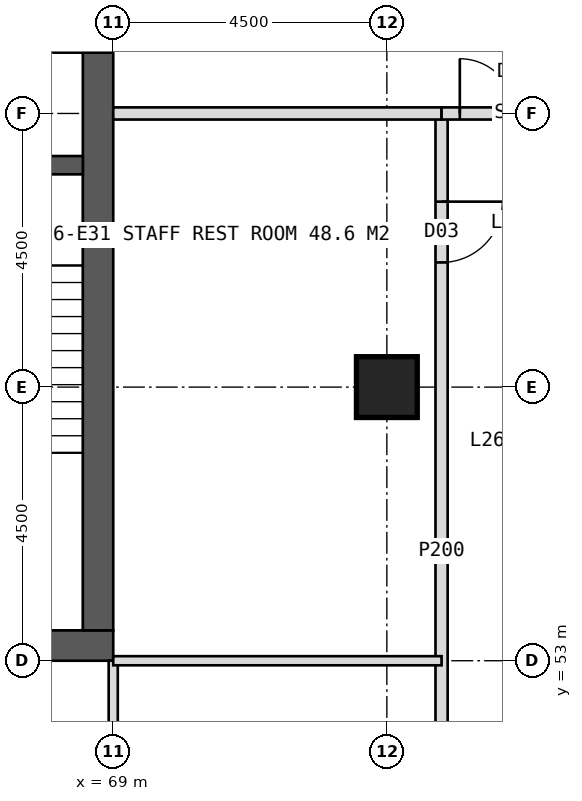
"""IFC4 building model, lengths in metres.
Left out: names, types, materials, properties, quantities, classifications, styles, units other than length and angle.
Written with IfcOpenShell. Run it as: python <this file> out.ifc"""

import sys

from ifc_helpers import new_model, si_unit, direction, frame, frame_2d, origin, origin_2d, place, context, subcontext, project, spatial, rectangle, hollow_rectangle, extrude, element, fill, save


model = new_model("IFC4")
c1 = context("Model", 3, precision=1e-05, world=origin(), true_north=direction((0.0, 1.0)))
c2 = subcontext(c1, "Body", "Model", "MODEL_VIEW")
j1 = project(units=[si_unit("LENGTHUNIT", "METRE"), si_unit("PLANEANGLEUNIT", "RADIAN")], contexts=[c1])
p1 = place(None, origin())
s1 = spatial("IfcSite", under=j1, at=p1, CompositionType="ELEMENT")
p2 = place(p1, origin())
s2 = spatial("IfcBuilding", under=s1, at=p2, CompositionType="ELEMENT")
p3 = place(p2, frame((0.0, 0.0, 112.0)))
s3 = spatial("IfcBuildingStorey", under=s2, at=p3, CompositionType="ELEMENT", Elevation=112.0)
p4 = place(p3, frame((51.0, 53.25, 0.0), z_axis=(0.0, 0.0, 1.0), x_axis=(1.0, 0.0, 0.0)))
e1 = element("IfcWall", 1, at=p4, inside=s3, PredefinedType="SHEAR", context=c2, shape_type="SweptSolid", body=[
    extrude(rectangle(XDim=18.0, YDim=0.5, at=frame_2d((9.0, 0.0))), origin(), (0.0, 0.0, 1.0), 4.0),
])
p5 = place(p4, frame((8.1, 0.0, 0.0)))
e2 = element("IfcOpeningElement", 2, at=p5, cuts=e1, PredefinedType="OPENING", context=c2, shape_type="SweptSolid", body=[
    extrude(rectangle(XDim=1.8, YDim=2.2, at=frame_2d((0.9, 1.1))), frame((0.0, 0.26, 0.0), z_axis=(0.0, -1.0, 0.0), x_axis=(1.0, 0.0, 0.0)), (0.0, 0.0, 1.0), 0.52),
])
p6 = place(p3, frame((68.75, 53.5, 0.0), z_axis=(0.0, 0.0, 1.0), x_axis=(0.0, 1.0, 0.0)))
e3 = element("IfcWall", 3, at=p6, inside=s3, PredefinedType="SHEAR", context=c2, shape_type="SweptSolid", body=[
    extrude(rectangle(XDim=17.0, YDim=0.5, at=frame_2d((8.5, 0.0))), origin(), (0.0, 0.0, 1.0), 4.0),
])
p7 = place(p6, frame((9.5, 0.0, 0.0)))
e4 = element("IfcOpeningElement", 4, at=p7, cuts=e3, PredefinedType="OPENING", context=c2, shape_type="SweptSolid", body=[
    extrude(rectangle(XDim=1.5, YDim=2.2, at=frame_2d((0.75, 1.1))), frame((0.0, 0.26, 0.0), z_axis=(0.0, -1.0, 0.0), x_axis=(1.0, 0.0, 0.0)), (0.0, 0.0, 1.0), 0.52),
])
p8 = place(p3, frame((65.2, 61.15, 0.0), z_axis=(0.0, 0.0, 1.0), x_axis=(1.0, 0.0, 0.0)))
e5 = element("IfcWall", 5, at=p8, inside=s3, PredefinedType="SHEAR", context=c2, shape_type="SweptSolid", body=[
    extrude(rectangle(XDim=3.3, YDim=0.3, at=frame_2d((1.65, 0.0))), origin(), (0.0, 0.0, 1.0), 4.0),
])
p9 = place(p8, frame((1.05, 0.0, 0.0)))
e6 = element("IfcOpeningElement", 6, at=p9, cuts=e5, PredefinedType="OPENING", context=c2, shape_type="SweptSolid", body=[
    extrude(rectangle(XDim=1.2, YDim=2.1, at=frame_2d((0.6, 1.05))), frame((0.0, 0.16, 0.0), z_axis=(0.0, -1.0, 0.0), x_axis=(1.0, 0.0, 0.0)), (0.0, 0.0, 1.0), 0.32),
])
p10 = place(p3, frame((73.5, 57.5, 0.0), z_axis=(0.0, 0.0, 1.0), x_axis=(1.0, 0.0, 0.0)))
e7 = element("IfcColumn", 7, at=p10, inside=s3, PredefinedType="COLUMN", context=c2, shape_type="SweptSolid", body=[
    extrude(hollow_rectangle(XDim=1.0, YDim=1.0, WallThickness=0.1, at=origin_2d()), origin(), (0.0, 0.0, 1.0), 4.0),
])
p11 = place(p3, frame((69.0, 53.0, 0.0), z_axis=(0.0, 0.0, 1.0), x_axis=(0.0, -1.0, 0.0)))
e8 = element("IfcWall", 8, at=p11, inside=s3, PredefinedType="PARTITIONING", context=c2, shape_type="SweptSolid", body=[
    extrude(rectangle(XDim=5.4, YDim=0.15, at=frame_2d((2.7, 0.0))), origin(), (0.0, 0.0, 1.0), 3.75),
])
p12 = place(p3, frame((74.4, 62.0, 0.0), z_axis=(0.0, 0.0, 1.0), x_axis=(0.0, -1.0, 0.0)))
e9 = element("IfcWall", 9, at=p12, inside=s3, PredefinedType="PARTITIONING", context=c2, shape_type="SweptSolid", body=[
    extrude(rectangle(XDim=14.4, YDim=0.2, at=frame_2d((7.2, 0.0))), origin(), (0.0, 0.0, 1.0), 3.75),
])
p13 = place(p12, frame((1.45, 0.0, 0.0)))
e10 = element("IfcOpeningElement", 10, at=p13, cuts=e9, PredefinedType="OPENING", context=c2, shape_type="SweptSolid", body=[
    extrude(rectangle(XDim=1.0, YDim=2.1, at=frame_2d((0.5, 1.05))), frame((0.0, 0.11, 0.0), z_axis=(0.0, -1.0, 0.0), x_axis=(1.0, 0.0, 0.0)), (0.0, 0.0, 1.0), 0.22),
])
p14 = place(p12, frame((11.2, 0.0, 0.0)))
e11 = element("IfcOpeningElement", 11, at=p14, cuts=e9, PredefinedType="OPENING", context=c2, shape_type="SweptSolid", body=[
    extrude(rectangle(XDim=1.0, YDim=2.1, at=frame_2d((0.5, 1.05))), frame((0.0, 0.11, 0.0), z_axis=(0.0, -1.0, 0.0), x_axis=(1.0, 0.0, 0.0)), (0.0, 0.0, 1.0), 0.22),
])
p15 = place(p3, frame((69.0, 62.0, 0.0), z_axis=(0.0, 0.0, 1.0), x_axis=(1.0, 0.0, 0.0)))
e12 = element("IfcWall", 12, at=p15, inside=s3, PredefinedType="SOLIDWALL", context=c2, shape_type="SweptSolid", body=[
    extrude(rectangle(XDim=5.4, YDim=0.2, at=frame_2d((2.7, 0.0))), origin(), (0.0, 0.0, 1.0), 2.95),
])
p16 = place(p3, frame((69.0, 53.0, 0.0), z_axis=(0.0, 0.0, 1.0), x_axis=(1.0, 0.0, 0.0)))
e13 = element("IfcWall", 13, at=p16, inside=s3, PredefinedType="PARTITIONING", context=c2, shape_type="SweptSolid", body=[
    extrude(rectangle(XDim=5.4, YDim=0.15, at=frame_2d((2.7, 0.0))), origin(), (0.0, 0.0, 1.0), 3.75),
])
p17 = place(p3, frame((74.4, 62.0, 0.0), z_axis=(0.0, 0.0, 1.0), x_axis=(1.0, 0.0, 0.0)))
e14 = element("IfcWall", 14, at=p17, inside=s3, PredefinedType="SOLIDWALL", context=c2, shape_type="SweptSolid", body=[
    extrude(rectangle(XDim=2.7, YDim=0.2, at=frame_2d((1.35, 0.0))), origin(), (0.0, 0.0, 1.0), 2.95),
])
p18 = place(p17, frame((0.3, 0.0, 0.0)))
e15 = element("IfcOpeningElement", 15, at=p18, cuts=e14, PredefinedType="OPENING", context=c2, shape_type="SweptSolid", body=[
    extrude(rectangle(XDim=1.8, YDim=2.2, at=frame_2d((0.9, 1.1))), frame((0.0, 0.11, 0.0), z_axis=(0.0, -1.0, 0.0), x_axis=(1.0, 0.0, 0.0)), (0.0, 0.0, 1.0), 0.22),
])
p19 = place(p13, origin())
e16 = element("IfcDoor", 16, at=p19, inside=s3, OperationType="SINGLE_SWING_LEFT", PredefinedType="DOOR", context=c2, shape_type="SweptSolid", body=[
    extrude(rectangle(XDim=1.0, YDim=2.1, at=frame_2d((0.5, 1.05))), frame((0.0, 0.025, 0.0), z_axis=(0.0, -1.0, 0.0), x_axis=(1.0, 0.0, 0.0)), (0.0, 0.0, 1.0), 0.05),
])
fill(e10, e16)
p20 = place(p18, origin())
e17 = element("IfcDoor", 17, at=p20, inside=s3, OperationType="DOUBLE_DOOR_DOUBLE_SWING", PredefinedType="DOOR", context=c2, shape_type="SweptSolid", body=[
    extrude(rectangle(XDim=1.8, YDim=2.2, at=frame_2d((0.9, 1.1))), frame((0.0, 0.025, 0.0), z_axis=(0.0, -1.0, 0.0), x_axis=(1.0, 0.0, 0.0)), (0.0, 0.0, 1.0), 0.05),
])
fill(e15, e17)
save(model, sys.argv[1])
